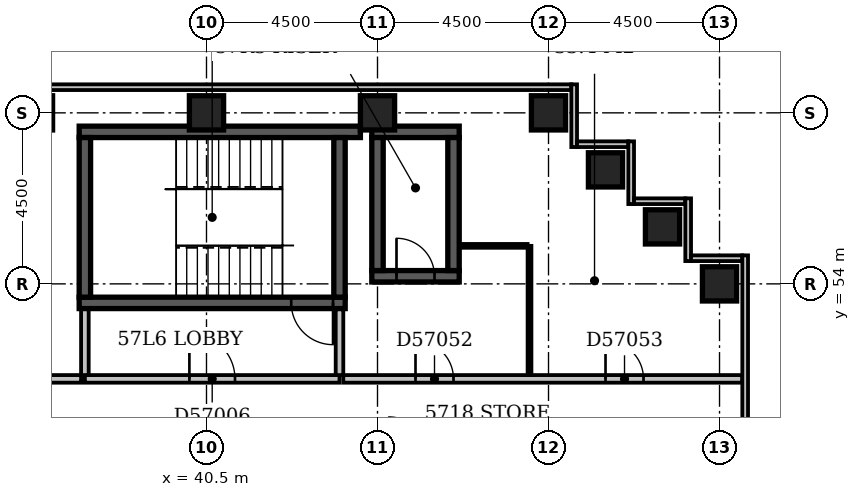
"""IFC4 building model, lengths in metres.
Left out: names, types, materials, properties, quantities, classifications, styles, units other than length and angle.
Written with IfcOpenShell. Run it as: python <this file> out.ifc"""

import sys

from ifc_helpers import new_model, si_unit, direction, frame, frame_2d, origin, origin_2d, place, context, subcontext, project, spatial, rectangle, extrude, element, fill, save


model = new_model("IFC4")
c1 = context("Model", 3, precision=1e-05, world=origin(), true_north=direction((0.0, 1.0)))
c2 = subcontext(c1, "Body", "Model", "MODEL_VIEW")
j1 = project(units=[si_unit("LENGTHUNIT", "METRE"), si_unit("PLANEANGLEUNIT", "RADIAN")], contexts=[c1])
p1 = place(None, origin())
s1 = spatial("IfcSite", under=j1, at=p1, CompositionType="ELEMENT")
p2 = place(p1, origin())
s2 = spatial("IfcBuilding", under=s1, at=p2, CompositionType="ELEMENT")
p3 = place(p2, frame((0.0, 0.0, 222.2)))
s3 = spatial("IfcBuildingStorey", under=s2, at=p3, CompositionType="ELEMENT", Elevation=222.2)
p4 = place(p3, frame((37.15, 53.5, -0.3), z_axis=(0.0, 0.0, 1.0), x_axis=(1.0, 0.0, 0.0)))
e1 = element("IfcWall", 1, at=p4, inside=s3, PredefinedType="SHEAR", context=c2, shape_type="SweptSolid", body=[
    extrude(rectangle(XDim=7.0, YDim=0.3, at=frame_2d((3.5, 0.0))), origin(), (0.0, 0.0, 1.0), 3.6),
])
p5 = place(p4, frame((5.58, 0.0, 0.3)))
e2 = element("IfcOpeningElement", 2, at=p5, cuts=e1, PredefinedType="OPENING", context=c2, shape_type="SweptSolid", body=[
    extrude(rectangle(XDim=1.1, YDim=2.1, at=frame_2d((0.55, 1.05))), frame((0.0, 0.162, 0.0), z_axis=(0.0, -1.0, 0.0), x_axis=(1.0, 0.0, 0.0)), (0.0, 0.0, 1.0), 0.324),
])
p6 = place(p3, frame((37.15, 58.0, -0.3), z_axis=(0.0, 0.0, 1.0), x_axis=(1.0, 0.0, 0.0)))
e3 = element("IfcWall", 3, at=p6, inside=s3, PredefinedType="SHEAR", context=c2, shape_type="SweptSolid", body=[
    extrude(rectangle(XDim=7.4, YDim=0.3, at=frame_2d((3.7, 0.0))), origin(), (0.0, 0.0, 1.0), 3.6),
])
for number, where, z_axis, x_axis in (
    (4, (37.3, 53.65, -0.3), (0.0, 0.0, 1.0), (0.0, 1.0, 0.0)),
    (5, (44.0, 53.65, -0.3), (0.0, 0.0, 1.0), (0.0, 1.0, 0.0)),
):
    element("IfcWall", number, at=place(p3, frame(where, z_axis=z_axis, x_axis=x_axis)), inside=s3, PredefinedType="SHEAR", context=c2, shape_type="SweptSolid", body=[
        extrude(rectangle(XDim=4.2, YDim=0.3, at=frame_2d((2.1, 0.0))), origin(), (0.0, 0.0, 1.0), 3.6),
    ])
p7 = place(p3, frame((44.85, 54.2, -0.3), z_axis=(0.0, 0.0, 1.0), x_axis=(1.0, 0.0, 0.0)))
e6 = element("IfcWall", 6, at=p7, inside=s3, PredefinedType="SHEAR", context=c2, shape_type="SweptSolid", body=[
    extrude(rectangle(XDim=2.3, YDim=0.3, at=frame_2d((1.15, 0.0))), origin(), (0.0, 0.0, 1.0), 3.6),
])
p8 = place(p7, frame((0.65, 0.0, 0.3)))
e7 = element("IfcOpeningElement", 7, at=p8, cuts=e6, PredefinedType="OPENING", context=c2, shape_type="SweptSolid", body=[
    extrude(rectangle(XDim=1.0, YDim=2.1, at=frame_2d((0.5, 1.05))), frame((0.0, 0.162, 0.0), z_axis=(0.0, -1.0, 0.0), x_axis=(1.0, 0.0, 0.0)), (0.0, 0.0, 1.0), 0.324),
])
p9 = place(p3, frame((44.85, 58.0, -0.3), z_axis=(0.0, 0.0, 1.0), x_axis=(1.0, 0.0, 0.0)))
e8 = element("IfcWall", 8, at=p9, inside=s3, PredefinedType="SHEAR", context=c2, shape_type="SweptSolid", body=[
    extrude(rectangle(XDim=2.3, YDim=0.3, at=frame_2d((1.15, 0.0))), origin(), (0.0, 0.0, 1.0), 3.6),
])
for number, where, z_axis, x_axis in (
    (9, (45.0, 54.35, -0.3), (0.0, 0.0, 1.0), (0.0, 1.0, 0.0)),
    (10, (47.0, 54.35, -0.3), (0.0, 0.0, 1.0), (0.0, 1.0, 0.0)),
):
    element("IfcWall", number, at=place(p3, frame(where, z_axis=z_axis, x_axis=x_axis)), inside=s3, PredefinedType="SHEAR", context=c2, shape_type="SweptSolid", body=[
        extrude(rectangle(XDim=3.5, YDim=0.3, at=frame_2d((1.75, 0.0))), origin(), (0.0, 0.0, 1.0), 3.6),
    ])
for number, where, z_axis, x_axis in (
    (11, (54.0, 54.0, -0.3), (0.0, 0.0, 1.0), (1.0, 0.0, 0.0)),
    (12, (52.5, 55.5, -0.3), (0.0, 0.0, 1.0), (1.0, 0.0, 0.0)),
    (13, (51.0, 57.0, -0.3), (0.0, 0.0, 1.0), (1.0, 0.0, 0.0)),
    (14, (40.5, 58.5, -0.3), (0.0, 0.0, 1.0), (1.0, 0.0, 0.0)),
    (15, (45.0, 58.5, -0.3), (0.0, 0.0, 1.0), (1.0, 0.0, 0.0)),
    (16, (49.5, 58.5, -0.3), (0.0, 0.0, 1.0), (1.0, 0.0, 0.0)),
):
    element("IfcColumn", number, at=place(p3, frame(where, z_axis=z_axis, x_axis=x_axis)), inside=s3, PredefinedType="COLUMN", context=c2, shape_type="SweptSolid", body=[
        extrude(rectangle(XDim=0.9, YDim=0.9, at=origin_2d()), origin(), (0.0, 0.0, 1.0), 3.6),
    ])
p10 = place(p3, frame((54.675, 39.9, 0.0), z_axis=(0.0, 0.0, 1.0), x_axis=(0.0, 1.0, 0.0)))
e17 = element("IfcWall", 17, at=p10, inside=s3, PredefinedType="STANDARD", context=c2, shape_type="SweptSolid", body=[
    extrude(rectangle(XDim=14.85, YDim=0.15, at=frame_2d((7.425, 0.0))), origin(), (0.0, 0.0, 1.0), 2.7),
])
p11 = place(p10, frame((7.02, 0.0, 0.6)))
e18 = element("IfcOpeningElement", 18, at=p11, cuts=e17, PredefinedType="OPENING", context=c2, shape_type="SweptSolid", body=[
    extrude(rectangle(XDim=1.8, YDim=1.8, at=frame_2d((0.9, 0.9))), frame((0.0, 0.087, 0.0), z_axis=(0.0, -1.0, 0.0), x_axis=(1.0, 0.0, 0.0)), (0.0, 0.0, 1.0), 0.174),
])
p12 = place(p3, frame((54.6, 54.675, 0.0), z_axis=(0.0, 0.0, 1.0), x_axis=(-1.0, 0.0, 0.0)))
e19 = element("IfcWall", 19, at=p12, inside=s3, PredefinedType="STANDARD", context=c2, shape_type="SweptSolid", body=[
    extrude(rectangle(XDim=1.35, YDim=0.15, at=frame_2d((0.675, 0.0))), origin(), (0.0, 0.0, 1.0), 2.7),
])
p13 = place(p3, frame((53.175, 54.6, 0.0), z_axis=(0.0, 0.0, 1.0), x_axis=(0.0, 1.0, 0.0)))
e20 = element("IfcWall", 20, at=p13, inside=s3, PredefinedType="STANDARD", context=c2, shape_type="SweptSolid", body=[
    extrude(rectangle(XDim=1.65, YDim=0.15, at=frame_2d((0.825, 0.0))), origin(), (0.0, 0.0, 1.0), 2.7),
])
p14 = place(p3, frame((53.1, 56.175, 0.0), z_axis=(0.0, 0.0, 1.0), x_axis=(-1.0, 0.0, 0.0)))
e21 = element("IfcWall", 21, at=p14, inside=s3, PredefinedType="STANDARD", context=c2, shape_type="SweptSolid", body=[
    extrude(rectangle(XDim=1.35, YDim=0.15, at=frame_2d((0.675, 0.0))), origin(), (0.0, 0.0, 1.0), 2.7),
])
p15 = place(p3, frame((51.675, 56.1, 0.0), z_axis=(0.0, 0.0, 1.0), x_axis=(0.0, 1.0, 0.0)))
e22 = element("IfcWall", 22, at=p15, inside=s3, PredefinedType="STANDARD", context=c2, shape_type="SweptSolid", body=[
    extrude(rectangle(XDim=1.65, YDim=0.15, at=frame_2d((0.825, 0.0))), origin(), (0.0, 0.0, 1.0), 2.7),
])
p16 = place(p3, frame((51.6, 57.675, 0.0), z_axis=(0.0, 0.0, 1.0), x_axis=(-1.0, 0.0, 0.0)))
e23 = element("IfcWall", 23, at=p16, inside=s3, PredefinedType="STANDARD", context=c2, shape_type="SweptSolid", body=[
    extrude(rectangle(XDim=1.35, YDim=0.15, at=frame_2d((0.675, 0.0))), origin(), (0.0, 0.0, 1.0), 2.7),
])
p17 = place(p3, frame((50.175, 57.6, 0.0), z_axis=(0.0, 0.0, 1.0), x_axis=(0.0, 1.0, 0.0)))
e24 = element("IfcWall", 24, at=p17, inside=s3, PredefinedType="STANDARD", context=c2, shape_type="SweptSolid", body=[
    extrude(rectangle(XDim=1.65, YDim=0.15, at=frame_2d((0.825, 0.0))), origin(), (0.0, 0.0, 1.0), 2.7),
])
p18 = place(p3, frame((50.1, 59.175, 0.0), z_axis=(0.0, 0.0, 1.0), x_axis=(-1.0, 0.0, 0.0)))
e25 = element("IfcWall", 25, at=p18, inside=s3, PredefinedType="STANDARD", context=c2, shape_type="SweptSolid", body=[
    extrude(rectangle(XDim=50.85, YDim=0.15, at=frame_2d((25.425, 0.0))), origin(), (0.0, 0.0, 1.0), 2.7),
])
p19 = place(p3, frame((37.3, 51.5, 0.0), z_axis=(0.0, 0.0, 1.0), x_axis=(1.0, 0.0, 0.0)))
e26 = element("IfcWall", 26, at=p19, inside=s3, PredefinedType="PARTITIONING", context=c2, shape_type="SweptSolid", body=[
    extrude(rectangle(XDim=6.7, YDim=0.2, at=frame_2d((3.35, 0.0))), origin(), (0.0, 0.0, 1.0), 3.3),
])
p20 = place(p19, frame((2.75, 0.0, 0.0)))
e27 = element("IfcOpeningElement", 27, at=p20, cuts=e26, PredefinedType="OPENING", context=c2, shape_type="SweptSolid", body=[
    extrude(rectangle(XDim=1.2, YDim=2.1, at=frame_2d((0.6, 1.05))), frame((0.0, 0.112, 0.0), z_axis=(0.0, -1.0, 0.0), x_axis=(1.0, 0.0, 0.0)), (0.0, 0.0, 1.0), 0.224),
])
for number, where, z_axis, x_axis in (
    (28, (44.0, 51.6, 0.0), (0.0, 0.0, 1.0), (0.0, 1.0, 0.0)),
    (29, (37.3, 51.6, 0.0), (0.0, 0.0, 1.0), (0.0, 1.0, 0.0)),
):
    element("IfcWall", number, at=place(p3, frame(where, z_axis=z_axis, x_axis=x_axis)), inside=s3, PredefinedType="PARTITIONING", context=c2, shape_type="SweptSolid", body=[
        extrude(rectangle(XDim=1.73, YDim=0.2, at=frame_2d((0.865, 0.0))), origin(), (0.0, 0.0, 1.0), 3.3),
    ])
p21 = place(p3, frame((27.9, 51.5, 0.0), z_axis=(0.0, 0.0, 1.0), x_axis=(1.0, 0.0, 0.0)))
e30 = element("IfcWall", 30, at=p21, inside=s3, PredefinedType="PARTITIONING", context=c2, shape_type="SweptSolid", body=[
    extrude(rectangle(XDim=9.3, YDim=0.2, at=frame_2d((4.65, 0.0))), origin(), (0.0, 0.0, 1.0), 3.3),
])
p22 = place(p21, frame((1.5, 0.0, 0.0)))
e31 = element("IfcOpeningElement", 31, at=p22, cuts=e30, PredefinedType="OPENING", context=c2, shape_type="SweptSolid", body=[
    extrude(rectangle(XDim=1.0, YDim=2.1, at=frame_2d((0.5, 1.05))), frame((0.0, 0.112, 0.0), z_axis=(0.0, -1.0, 0.0), x_axis=(1.0, 0.0, 0.0)), (0.0, 0.0, 1.0), 0.224),
])
p23 = place(p21, frame((6.3, 0.0, 0.0)))
e32 = element("IfcOpeningElement", 32, at=p23, cuts=e30, PredefinedType="OPENING", context=c2, shape_type="SweptSolid", body=[
    extrude(rectangle(XDim=0.9, YDim=2.1, at=frame_2d((0.45, 1.05))), frame((0.0, 0.112, 0.0), z_axis=(0.0, -1.0, 0.0), x_axis=(1.0, 0.0, 0.0)), (0.0, 0.0, 1.0), 0.224),
])
p24 = place(p3, frame((44.1, 51.5, 0.0), z_axis=(0.0, 0.0, 1.0), x_axis=(1.0, 0.0, 0.0)))
e33 = element("IfcWall", 33, at=p24, inside=s3, PredefinedType="PARTITIONING", context=c2, shape_type="SweptSolid", body=[
    extrude(rectangle(XDim=10.5, YDim=0.2, at=frame_2d((5.25, 0.0))), origin(), (0.0, 0.0, 1.0), 3.3),
])
p25 = place(p24, frame((1.9, 0.0, 0.0)))
e34 = element("IfcOpeningElement", 34, at=p25, cuts=e33, PredefinedType="OPENING", context=c2, shape_type="SweptSolid", body=[
    extrude(rectangle(XDim=1.0, YDim=2.1, at=frame_2d((0.5, 1.05))), frame((0.0, 0.112, 0.0), z_axis=(0.0, -1.0, 0.0), x_axis=(1.0, 0.0, 0.0)), (0.0, 0.0, 1.0), 0.224),
])
p26 = place(p24, frame((6.9, 0.0, 0.0)))
e35 = element("IfcOpeningElement", 35, at=p26, cuts=e33, PredefinedType="OPENING", context=c2, shape_type="SweptSolid", body=[
    extrude(rectangle(XDim=1.0, YDim=2.1, at=frame_2d((0.5, 1.05))), frame((0.0, 0.112, 0.0), z_axis=(0.0, -1.0, 0.0), x_axis=(1.0, 0.0, 0.0)), (0.0, 0.0, 1.0), 0.224),
])
p27 = place(p3, frame((49.0, 51.6, 0.0), z_axis=(0.0, 0.0, 1.0), x_axis=(0.0, 1.0, 0.0)))
e36 = element("IfcWall", 36, at=p27, inside=s3, PredefinedType="PARTITIONING", context=c2, shape_type="SweptSolid", body=[
    extrude(rectangle(XDim=3.4, YDim=0.1, at=frame_2d((1.7, 0.0))), origin(), (0.0, 0.0, 1.0), 3.3),
])
p28 = place(p3, frame((47.15, 55.0, 0.0), z_axis=(0.0, 0.0, 1.0), x_axis=(1.0, 0.0, 0.0)))
e37 = element("IfcWall", 37, at=p28, inside=s3, PredefinedType="PARTITIONING", context=c2, shape_type="SweptSolid", body=[
    extrude(rectangle(XDim=1.8, YDim=0.1, at=frame_2d((0.9, 0.0))), origin(), (0.0, 0.0, 1.0), 3.3),
])
p29 = place(p20, origin())
e38 = element("IfcDoor", 38, at=p29, inside=s3, OperationType="SINGLE_SWING_LEFT", PredefinedType="DOOR", context=c2, shape_type="SweptSolid", body=[
    extrude(rectangle(XDim=1.2, YDim=2.1, at=frame_2d((0.6, 1.05))), frame((0.0, 0.025, 0.0), z_axis=(0.0, -1.0, 0.0), x_axis=(1.0, 0.0, 0.0)), (0.0, 0.0, 1.0), 0.05),
])
fill(e27, e38)
p30 = place(p8, origin())
e39 = element("IfcDoor", 39, at=p30, inside=s3, OperationType="SINGLE_SWING_LEFT", PredefinedType="DOOR", context=c2, shape_type="SweptSolid", body=[
    extrude(rectangle(XDim=1.0, YDim=2.1, at=frame_2d((0.5, 1.05))), frame((0.0, 0.025, 0.0), z_axis=(0.0, -1.0, 0.0), x_axis=(1.0, 0.0, 0.0)), (0.0, 0.0, 1.0), 0.05),
])
fill(e7, e39)
p31 = place(p5, origin())
e40 = element("IfcDoor", 40, at=p31, inside=s3, OperationType="SINGLE_SWING_RIGHT", PredefinedType="DOOR", context=c2, shape_type="SweptSolid", body=[
    extrude(rectangle(XDim=1.1, YDim=2.1, at=frame_2d((0.55, 1.05))), frame((0.0, 0.025, 0.0), z_axis=(0.0, -1.0, 0.0), x_axis=(1.0, 0.0, 0.0)), (0.0, 0.0, 1.0), 0.05),
])
fill(e2, e40)
p32 = place(p25, origin())
e41 = element("IfcDoor", 41, at=p32, inside=s3, OperationType="SINGLE_SWING_LEFT", PredefinedType="DOOR", context=c2, shape_type="SweptSolid", body=[
    extrude(rectangle(XDim=1.0, YDim=2.1, at=frame_2d((0.5, 1.05))), frame((0.0, 0.025, 0.0), z_axis=(0.0, -1.0, 0.0), x_axis=(1.0, 0.0, 0.0)), (0.0, 0.0, 1.0), 0.05),
])
fill(e34, e41)
p33 = place(p26, origin())
e42 = element("IfcDoor", 42, at=p33, inside=s3, OperationType="SINGLE_SWING_LEFT", PredefinedType="DOOR", context=c2, shape_type="SweptSolid", body=[
    extrude(rectangle(XDim=1.0, YDim=2.1, at=frame_2d((0.5, 1.05))), frame((0.0, 0.025, 0.0), z_axis=(0.0, -1.0, 0.0), x_axis=(1.0, 0.0, 0.0)), (0.0, 0.0, 1.0), 0.05),
])
fill(e35, e42)
save(model, sys.argv[1])
